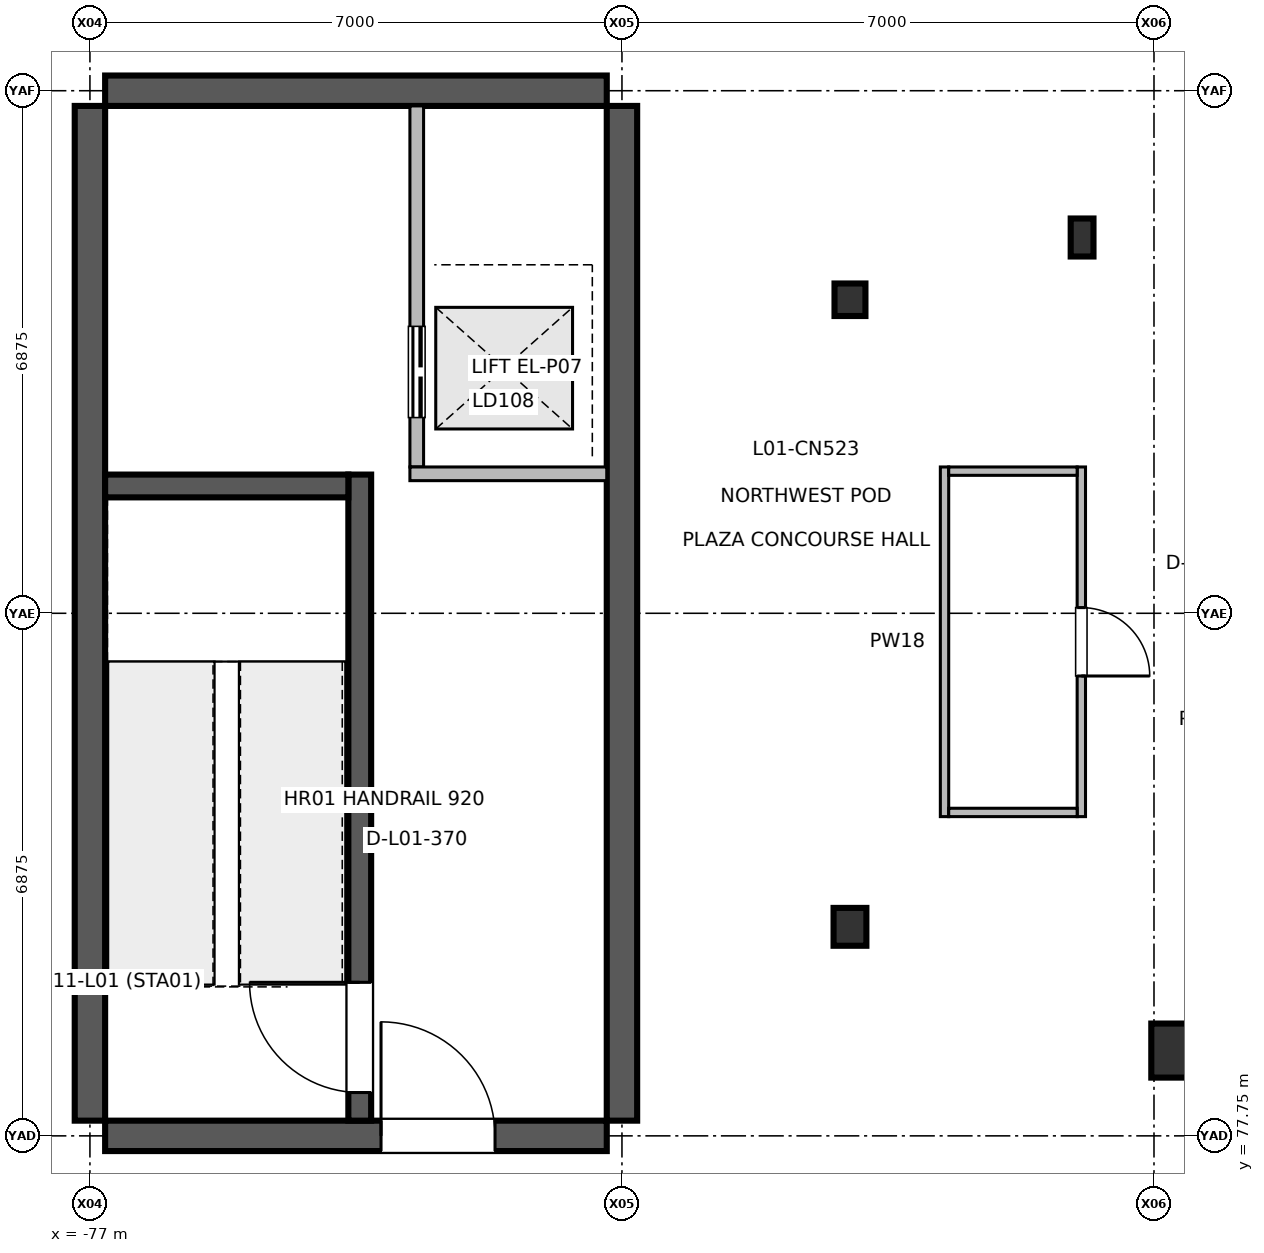
"""IFC4 building model, lengths in metres.
Left out: names, types, materials, properties, quantities, classifications, styles, units other than length and angle.
Written with IfcOpenShell. Run it as: python <this file> out.ifc"""

import sys

from ifc_helpers import new_model, si_unit, direction, frame, frame_2d, origin, origin_2d, place, context, subcontext, project, spatial, rectangle, hollow_rectangle, hollow_circle, i_section, extrude, element, fill, save


model = new_model("IFC4")
c1 = context("Model", 3, precision=1e-05, world=origin(), true_north=direction((0.0, 1.0)))
c2 = subcontext(c1, "Body", "Model", "MODEL_VIEW")
j1 = project(units=[si_unit("LENGTHUNIT", "METRE"), si_unit("PLANEANGLEUNIT", "RADIAN")], contexts=[c1])
p1 = place(None, origin())
s1 = spatial("IfcSite", under=j1, at=p1, CompositionType="ELEMENT")
p2 = place(p1, origin())
s2 = spatial("IfcBuilding", under=s1, at=p2, CompositionType="ELEMENT")
p3 = place(p2, origin())
s3 = spatial("IfcBuildingStorey", under=s2, at=p3, CompositionType="ELEMENT", Elevation=0.0)
p4 = place(p3, frame((-67.0, 80.5, 0.0), z_axis=(0.0, 0.0, 1.0), x_axis=(1.0, 0.0, 0.0)))
e1 = element("IfcColumn", 1, at=p4, inside=s3, PredefinedType="COLUMN", context=c2, shape_type="SweptSolid", body=[
    extrude(i_section(OverallWidth=0.432, OverallDepth=0.498, WebThickness=0.024, FlangeThickness=0.038, at=origin_2d()), origin(), (0.0, 0.0, 1.0), 5.998),
])
p5 = place(p3, frame((-67.0, 88.75, 0.0), z_axis=(0.0, 0.0, 1.0), x_axis=(1.0, 0.0, 0.0)))
e2 = element("IfcColumn", 2, at=p5, inside=s3, PredefinedType="COLUMN", context=c2, shape_type="SweptSolid", body=[
    extrude(i_section(OverallWidth=0.407, OverallDepth=0.428, WebThickness=0.02, FlangeThickness=0.035, at=origin_2d()), origin(), (0.0, 0.0, 1.0), 5.998),
])
p6 = place(p3, frame((-62.68, 78.872, 0.136), z_axis=(0.325537478247, -0.173163175193, 0.929537446805), x_axis=(0.46962342015, 0.882866832114, 0.0)))
e3 = element("IfcColumn", 3, at=p6, inside=s3, PredefinedType="PILASTER", context=c2, shape_type="SweptSolid", body=[
    extrude(hollow_circle(Radius=0.355, WallThickness=0.032, at=origin_2d()), origin(), (0.0, 0.0, 1.0), 6.306),
])
p7 = place(p3, frame((-63.946, 89.569, 0.076), z_axis=(0.26627892052, 0.095218241849, 0.959181433779), x_axis=(-0.336708404663, 0.941608968855, 0.0)))
e4 = element("IfcColumn", 4, at=p7, inside=s3, PredefinedType="PILASTER", context=c2, shape_type="SweptSolid", body=[
    extrude(hollow_rectangle(XDim=0.3, YDim=0.5, WallThickness=0.02, at=origin_2d()), origin(), (0.0, 0.0, 1.0), 6.174),
])
for number, where, z_axis, x_axis in (
    (5, (-77.0, 77.95, 0.0), (0.0, 0.0, 1.0), (0.0, 1.0, 0.0)),
    (6, (-70.0, 77.95, 0.0), (0.0, 0.0, 1.0), (0.0, 1.0, 0.0)),
):
    element("IfcWall", number, at=place(p3, frame(where, z_axis=z_axis, x_axis=x_axis)), inside=s3, PredefinedType="SHEAR", context=c2, shape_type="SweptSolid", body=[
        extrude(rectangle(XDim=13.35, YDim=0.4, at=frame_2d((6.675, 0.0))), origin(), (0.0, 0.0, 1.0), 5.78),
    ])
p8 = place(p3, frame((-76.8, 77.75, 0.0), z_axis=(0.0, 0.0, 1.0), x_axis=(1.0, 0.0, 0.0)))
e7 = element("IfcWall", 7, at=p8, inside=s3, PredefinedType="SHEAR", context=c2, shape_type="SweptSolid", body=[
    extrude(rectangle(XDim=6.6, YDim=0.4, at=frame_2d((3.3, 0.0))), origin(), (0.0, 0.0, 1.0), 5.78),
])
p9 = place(p8, frame((3.63, 0.0, 0.0)))
e8 = element("IfcOpeningElement", 8, at=p9, cuts=e7, PredefinedType="OPENING", context=c2, shape_type="SweptSolid", body=[
    extrude(rectangle(XDim=1.5, YDim=2.2, at=frame_2d((0.75, 1.1))), frame((0.0, 0.21, 0.0), z_axis=(0.0, -1.0, 0.0), x_axis=(1.0, 0.0, 0.0)), (0.0, 0.0, 1.0), 0.42),
])
p10 = place(p3, frame((-76.8, 91.5, 0.0), z_axis=(0.0, 0.0, 1.0), x_axis=(1.0, 0.0, 0.0)))
e9 = element("IfcWall", 9, at=p10, inside=s3, PredefinedType="SHEAR", context=c2, shape_type="SweptSolid", body=[
    extrude(rectangle(XDim=6.6, YDim=0.4, at=frame_2d((3.3, 0.0))), origin(), (0.0, 0.0, 1.0), 5.78),
])
p11 = place(p3, frame((-73.45, 77.95, 0.0), z_axis=(0.0, 0.0, 1.0), x_axis=(0.0, 1.0, 0.0)))
e10 = element("IfcWall", 10, at=p11, inside=s3, PredefinedType="SHEAR", context=c2, shape_type="SweptSolid", body=[
    extrude(rectangle(XDim=8.5, YDim=0.3, at=frame_2d((4.25, 0.0))), origin(), (0.0, 0.0, 1.0), 5.78),
])
p12 = place(p11, frame((0.37, 0.0, 0.0)))
e11 = element("IfcOpeningElement", 11, at=p12, cuts=e10, PredefinedType="OPENING", context=c2, shape_type="SweptSolid", body=[
    extrude(rectangle(XDim=1.45, YDim=2.2, at=frame_2d((0.725, 1.1))), frame((0.0, 0.16, 0.0), z_axis=(0.0, -1.0, 0.0), x_axis=(1.0, 0.0, 0.0)), (0.0, 0.0, 1.0), 0.32),
])
p13 = place(p3, frame((-72.7, 86.55, 0.0), z_axis=(0.0, 0.0, 1.0), x_axis=(0.0, 1.0, 0.0)))
e12 = element("IfcWall", 12, at=p13, inside=s3, PredefinedType="PARTITIONING", context=c2, shape_type="SweptSolid", body=[
    extrude(rectangle(XDim=4.75, YDim=0.18, at=frame_2d((2.375, 0.0))), origin(), (0.0, 0.0, 1.0), 5.02),
])
p14 = place(p13, frame((0.65, 0.0, 0.0)))
e13 = element("IfcOpeningElement", 13, at=p14, cuts=e12, PredefinedType="OPENING", context=c2, shape_type="SweptSolid", body=[
    extrude(rectangle(XDim=1.2, YDim=2.25, at=frame_2d((0.6, 1.125))), frame((0.0, 0.1, 0.0), z_axis=(0.0, -1.0, 0.0), x_axis=(1.0, 0.0, 0.0)), (0.0, 0.0, 1.0), 0.2),
])
p15 = place(p3, frame((-63.956, 86.55, 0.0), z_axis=(0.0, 0.0, 1.0), x_axis=(0.0, -1.0, 0.0)))
e14 = element("IfcWall", 14, at=p15, inside=s3, PredefinedType="PARTITIONING", context=c2, shape_type="SweptSolid", body=[
    extrude(rectangle(XDim=4.6, YDim=0.11, at=frame_2d((2.3, 0.0))), origin(), (0.0, 0.0, 1.0), 5.02),
])
p16 = place(p15, frame((1.85, 0.0, 0.0)))
e15 = element("IfcOpeningElement", 15, at=p16, cuts=e14, PredefinedType="OPENING", context=c2, shape_type="SweptSolid", body=[
    extrude(rectangle(XDim=0.9, YDim=2.15, at=frame_2d((0.45, 1.075))), frame((0.0, 0.065, 0.0), z_axis=(0.0, -1.0, 0.0), x_axis=(1.0, 0.0, 0.0)), (0.0, 0.0, 1.0), 0.13),
])
p17 = place(p3, frame((-72.79, 86.46, 0.0), z_axis=(0.0, 0.0, 1.0), x_axis=(1.0, 0.0, 0.0)))
e16 = element("IfcWall", 16, at=p17, inside=s3, PredefinedType="PARTITIONING", context=c2, shape_type="SweptSolid", body=[
    extrude(rectangle(XDim=2.59, YDim=0.18, at=frame_2d((1.295, 0.0))), origin(), (0.0, 0.0, 1.0), 5.02),
])
p18 = place(p3, frame((-65.756, 81.95, 0.0), z_axis=(0.0, 0.0, 1.0), x_axis=(0.0, 1.0, 0.0)))
e17 = element("IfcWall", 17, at=p18, inside=s3, PredefinedType="PARTITIONING", context=c2, shape_type="SweptSolid", body=[
    extrude(rectangle(XDim=4.6, YDim=0.11, at=frame_2d((2.3, 0.0))), origin(), (0.0, 0.0, 1.0), 5.02),
])
for number, where, z_axis, x_axis in (
    (18, (-65.701, 82.005, 0.0), (0.0, 0.0, 1.0), (1.0, 0.0, 0.0)),
    (19, (-65.701, 86.495, 0.0), (0.0, 0.0, 1.0), (1.0, 0.0, 0.0)),
):
    element("IfcWall", number, at=place(p3, frame(where, z_axis=z_axis, x_axis=x_axis)), inside=s3, PredefinedType="PARTITIONING", context=c2, shape_type="SweptSolid", body=[
        extrude(rectangle(XDim=1.69, YDim=0.11, at=frame_2d((0.845, 0.0))), origin(), (0.0, 0.0, 1.0), 5.02),
    ])
p19 = place(p3, frame((-76.8, 86.3, 0.0), z_axis=(0.0, 0.0, 1.0), x_axis=(1.0, 0.0, 0.0)))
e20 = element("IfcWall", 20, at=p19, inside=s3, PredefinedType="SHEAR", context=c2, shape_type="SweptSolid", body=[
    extrude(rectangle(XDim=3.2, YDim=0.3, at=frame_2d((1.6, 0.0))), origin(), (0.0, 0.0, 1.0), 5.78),
])
p20 = place(p9, origin())
e21 = element("IfcDoor", 21, at=p20, inside=s3, OperationType="SINGLE_SWING_LEFT", PredefinedType="DOOR", context=c2, shape_type="SweptSolid", body=[
    extrude(rectangle(XDim=1.5, YDim=2.2, at=frame_2d((0.75, 1.1))), frame((0.0, 0.025, 0.0), z_axis=(0.0, -1.0, 0.0), x_axis=(1.0, 0.0, 0.0)), (0.0, 0.0, 1.0), 0.05),
])
fill(e8, e21)
p21 = place(p12, origin())
e22 = element("IfcDoor", 22, at=p21, inside=s3, OperationType="SINGLE_SWING_RIGHT", PredefinedType="DOOR", context=c2, shape_type="SweptSolid", body=[
    extrude(rectangle(XDim=1.45, YDim=2.2, at=frame_2d((0.725, 1.1))), frame((0.0, 0.025, 0.0), z_axis=(0.0, -1.0, 0.0), x_axis=(1.0, 0.0, 0.0)), (0.0, 0.0, 1.0), 0.05),
])
fill(e11, e22)
p22 = place(p14, origin())
e23 = element("IfcDoor", 23, at=p22, inside=s3, OperationType="DOUBLE_DOOR_SLIDING", PredefinedType="DOOR", context=c2, shape_type="SweptSolid", body=[
    extrude(rectangle(XDim=1.2, YDim=2.25, at=frame_2d((0.6, 1.125))), frame((0.0, 0.025, 0.0), z_axis=(0.0, -1.0, 0.0), x_axis=(1.0, 0.0, 0.0)), (0.0, 0.0, 1.0), 0.05),
])
fill(e13, e23)
p23 = place(p16, origin())
e24 = element("IfcDoor", 24, at=p23, inside=s3, OperationType="SINGLE_SWING_RIGHT", PredefinedType="DOOR", context=c2, shape_type="SweptSolid", body=[
    extrude(rectangle(XDim=0.9, YDim=2.15, at=frame_2d((0.45, 1.075))), frame((0.0, 0.025, 0.0), z_axis=(0.0, -1.0, 0.0), x_axis=(1.0, 0.0, 0.0)), (0.0, 0.0, 1.0), 0.05),
])
fill(e15, e24)
save(model, sys.argv[1])
